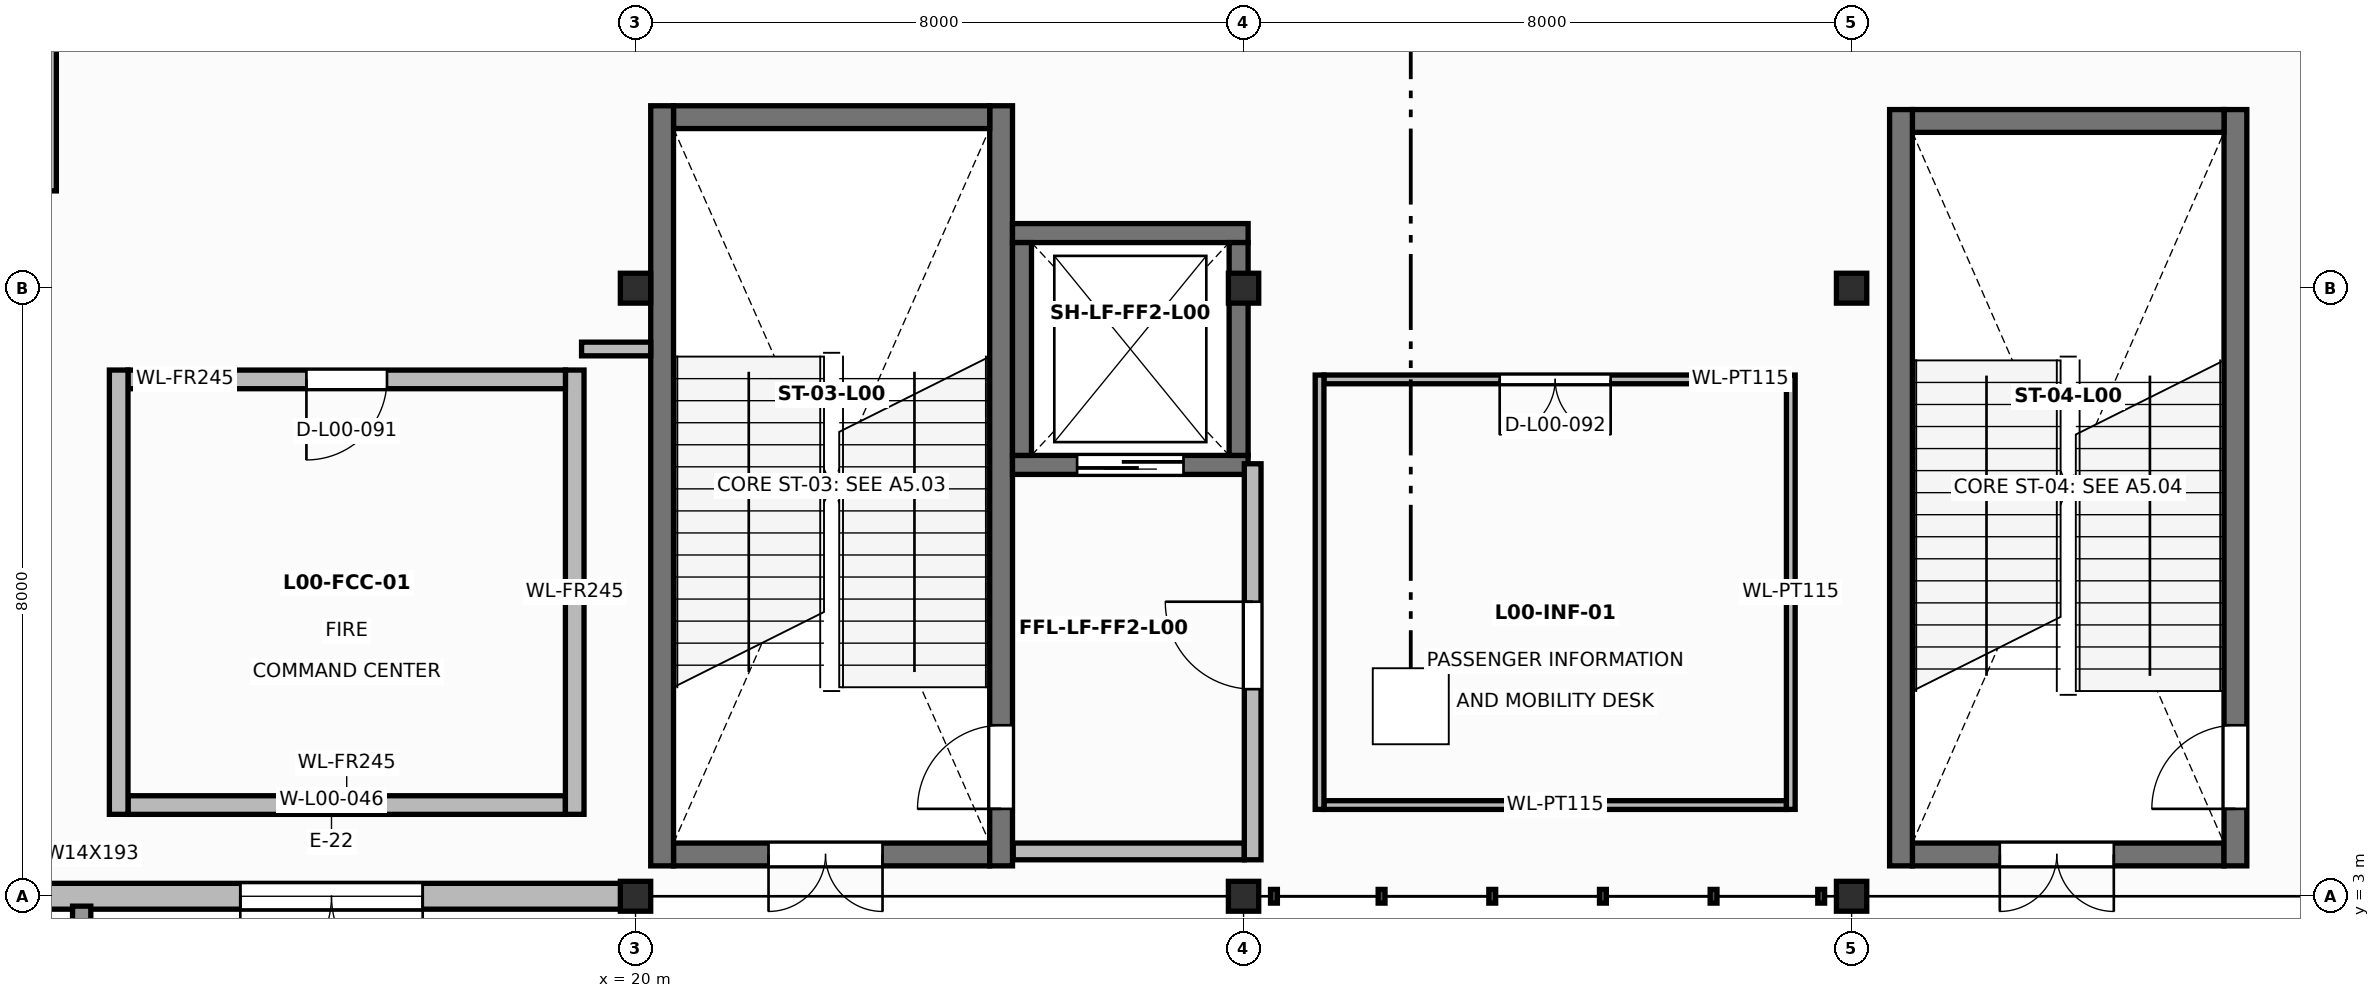
"""IFC4 building model, lengths in metres.
Left out: names, types, materials, properties, quantities, classifications, styles, units other than length and angle.
Written with IfcOpenShell. Run it as: python <this file> out.ifc"""

import sys

from ifc_helpers import new_model, si_unit, direction, frame, frame_2d, origin, origin_2d, place, context, subcontext, project, spatial, rectangle, i_section, extrude, element, fill, save


model = new_model("IFC4")
c1 = context("Model", 3, precision=1e-05, world=origin(), true_north=direction((0.0, 1.0)))
c2 = subcontext(c1, "Body", "Model", "MODEL_VIEW")
j1 = project(units=[si_unit("LENGTHUNIT", "METRE"), si_unit("PLANEANGLEUNIT", "RADIAN")], contexts=[c1])
p1 = place(None, origin())
s1 = spatial("IfcSite", under=j1, at=p1, CompositionType="ELEMENT")
p2 = place(p1, origin())
s2 = spatial("IfcBuilding", under=s1, at=p2, CompositionType="ELEMENT")
p3 = place(p2, origin())
s3 = spatial("IfcBuildingStorey", under=s2, at=p3, CompositionType="ELEMENT", Elevation=0.0)
for number, where, z_axis, x_axis in (
    (1, (20.0, 3.0, 0.0), (0.0, 0.0, 1.0), (1.0, 0.0, 0.0)),
    (2, (20.0, 11.0, 0.0), (0.0, 0.0, 1.0), (1.0, 0.0, 0.0)),
    (3, (28.0, 3.0, 0.0), (0.0, 0.0, 1.0), (1.0, 0.0, 0.0)),
    (4, (28.0, 11.0, 0.0), (0.0, 0.0, 1.0), (1.0, 0.0, 0.0)),
    (5, (36.0, 3.0, 0.0), (0.0, 0.0, 1.0), (1.0, 0.0, 0.0)),
    (6, (36.0, 11.0, 0.0), (0.0, 0.0, 1.0), (1.0, 0.0, 0.0)),
):
    element("IfcColumn", number, at=place(p3, frame(where, z_axis=z_axis, x_axis=x_axis)), inside=s3, PredefinedType="COLUMN", context=c2, shape_type="SweptSolid", body=[
        extrude(i_section(OverallWidth=0.399, OverallDepth=0.393, WebThickness=0.023, FlangeThickness=0.037, at=origin_2d()), origin(), (0.0, 0.0, 1.0), 6.0),
    ])
p4 = place(p3, frame((20.5, 3.55, 0.0), z_axis=(0.0, 0.0, 1.0), x_axis=(1.0, 0.0, 0.0)))
e7 = element("IfcWall", 7, at=p4, inside=s3, PredefinedType="SHEAR", context=c2, shape_type="SweptSolid", body=[
    extrude(rectangle(XDim=4.16, YDim=0.3, at=frame_2d((2.08, 0.0))), origin(), (0.0, 0.0, 1.0), 5.755),
])
p5 = place(p4, frame((1.25, 0.0, 0.0)))
e8 = element("IfcOpeningElement", 8, at=p5, cuts=e7, PredefinedType="OPENING", context=c2, shape_type="SweptSolid", body=[
    extrude(rectangle(XDim=1.5, YDim=2.2, at=frame_2d((0.75, 1.1))), frame((0.0, 0.16, 0.0), z_axis=(0.0, -1.0, 0.0), x_axis=(1.0, 0.0, 0.0)), (0.0, 0.0, 1.0), 0.32),
])
p6 = place(p3, frame((24.81, 3.4, 0.0), z_axis=(0.0, 0.0, 1.0), x_axis=(0.0, 1.0, 0.0)))
e9 = element("IfcWall", 9, at=p6, inside=s3, PredefinedType="SHEAR", context=c2, shape_type="SweptSolid", body=[
    extrude(rectangle(XDim=10.0, YDim=0.3, at=frame_2d((5.0, 0.0))), origin(), (0.0, 0.0, 1.0), 5.755),
])
p7 = place(p6, frame((0.75, 0.0, 0.0)))
e10 = element("IfcOpeningElement", 10, at=p7, cuts=e9, PredefinedType="OPENING", context=c2, shape_type="SweptSolid", body=[
    extrude(rectangle(XDim=1.1, YDim=2.15, at=frame_2d((0.55, 1.075))), frame((0.0, 0.16, 0.0), z_axis=(0.0, -1.0, 0.0), x_axis=(1.0, 0.0, 0.0)), (0.0, 0.0, 1.0), 0.32),
])
p8 = place(p3, frame((24.66, 13.25, 0.0), z_axis=(0.0, 0.0, 1.0), x_axis=(-1.0, 0.0, 0.0)))
e11 = element("IfcWall", 11, at=p8, inside=s3, PredefinedType="SHEAR", context=c2, shape_type="SweptSolid", body=[
    extrude(rectangle(XDim=4.16, YDim=0.3, at=frame_2d((2.08, 0.0))), origin(), (0.0, 0.0, 1.0), 5.755),
])
p9 = place(p3, frame((20.35, 13.4, 0.0), z_axis=(0.0, 0.0, 1.0), x_axis=(0.0, -1.0, 0.0)))
e12 = element("IfcWall", 12, at=p9, inside=s3, PredefinedType="SHEAR", context=c2, shape_type="SweptSolid", body=[
    extrude(rectangle(XDim=10.0, YDim=0.3, at=frame_2d((5.0, 0.0))), origin(), (0.0, 0.0, 1.0), 5.755),
])
p10 = place(p3, frame((36.8, 3.55, 0.0), z_axis=(0.0, 0.0, 1.0), x_axis=(1.0, 0.0, 0.0)))
e13 = element("IfcWall", 13, at=p10, inside=s3, PredefinedType="SHEAR", context=c2, shape_type="SweptSolid", body=[
    extrude(rectangle(XDim=4.1, YDim=0.3, at=frame_2d((2.05, 0.0))), origin(), (0.0, 0.0, 1.0), 5.755),
])
p11 = place(p10, frame((1.15, 0.0, 0.0)))
e14 = element("IfcOpeningElement", 14, at=p11, cuts=e13, PredefinedType="OPENING", context=c2, shape_type="SweptSolid", body=[
    extrude(rectangle(XDim=1.5, YDim=2.2, at=frame_2d((0.75, 1.1))), frame((0.0, 0.16, 0.0), z_axis=(0.0, -1.0, 0.0), x_axis=(1.0, 0.0, 0.0)), (0.0, 0.0, 1.0), 0.32),
])
p12 = place(p3, frame((41.05, 3.4, 0.0), z_axis=(0.0, 0.0, 1.0), x_axis=(0.0, 1.0, 0.0)))
e15 = element("IfcWall", 15, at=p12, inside=s3, PredefinedType="SHEAR", context=c2, shape_type="SweptSolid", body=[
    extrude(rectangle(XDim=9.95, YDim=0.3, at=frame_2d((4.975, 0.0))), origin(), (0.0, 0.0, 1.0), 5.755),
])
p13 = place(p12, frame((0.75, 0.0, 0.0)))
e16 = element("IfcOpeningElement", 16, at=p13, cuts=e15, PredefinedType="OPENING", context=c2, shape_type="SweptSolid", body=[
    extrude(rectangle(XDim=1.1, YDim=2.15, at=frame_2d((0.55, 1.075))), frame((0.0, 0.16, 0.0), z_axis=(0.0, -1.0, 0.0), x_axis=(1.0, 0.0, 0.0)), (0.0, 0.0, 1.0), 0.32),
])
p14 = place(p3, frame((40.9, 13.2, 0.0), z_axis=(0.0, 0.0, 1.0), x_axis=(-1.0, 0.0, 0.0)))
e17 = element("IfcWall", 17, at=p14, inside=s3, PredefinedType="SHEAR", context=c2, shape_type="SweptSolid", body=[
    extrude(rectangle(XDim=4.1, YDim=0.3, at=frame_2d((2.05, 0.0))), origin(), (0.0, 0.0, 1.0), 5.755),
])
p15 = place(p3, frame((36.65, 13.35, 0.0), z_axis=(0.0, 0.0, 1.0), x_axis=(0.0, -1.0, 0.0)))
e18 = element("IfcWall", 18, at=p15, inside=s3, PredefinedType="SHEAR", context=c2, shape_type="SweptSolid", body=[
    extrude(rectangle(XDim=9.95, YDim=0.3, at=frame_2d((4.975, 0.0))), origin(), (0.0, 0.0, 1.0), 5.755),
])
p16 = place(p3, frame((12.27, 12.28, 0.0), z_axis=(0.0, 0.0, 1.0), x_axis=(0.0, 1.0, 0.0)))
e19 = element("IfcWall", 19, at=p16, inside=s3, PredefinedType="SOLIDWALL", context=c2, shape_type="SweptSolid", body=[
    extrude(rectangle(XDim=5.21, YDim=0.22, at=frame_2d((2.605, 0.0))), origin(), (0.0, 0.0, 1.0), 5.755),
])
p17 = place(p3, frame((24.96, 8.675, 0.0), z_axis=(0.0, 0.0, 1.0), x_axis=(1.0, 0.0, 0.0)))
e20 = element("IfcWall", 20, at=p17, inside=s3, PredefinedType="SOLIDWALL", context=c2, shape_type="SweptSolid", body=[
    extrude(rectangle(XDim=3.1, YDim=0.25, at=frame_2d((1.55, 0.0))), origin(), (0.0, 0.0, 1.0), 5.755),
])
p18 = place(p17, frame((0.85, 0.0, 0.0)))
e21 = element("IfcOpeningElement", 21, at=p18, cuts=e20, PredefinedType="OPENING", context=c2, shape_type="SweptSolid", body=[
    extrude(rectangle(XDim=1.4, YDim=2.25, at=frame_2d((0.7, 1.125))), frame((0.0, 0.135, 0.0), z_axis=(0.0, -1.0, 0.0), x_axis=(1.0, 0.0, 0.0)), (0.0, 0.0, 1.0), 0.27),
])
p19 = place(p3, frame((28.06, 11.725, 0.0), z_axis=(0.0, 0.0, 1.0), x_axis=(-1.0, 0.0, 0.0)))
e22 = element("IfcWall", 22, at=p19, inside=s3, PredefinedType="SOLIDWALL", context=c2, shape_type="SweptSolid", body=[
    extrude(rectangle(XDim=3.1, YDim=0.25, at=frame_2d((1.55, 0.0))), origin(), (0.0, 0.0, 1.0), 5.755),
])
for number, where, z_axis, x_axis in (
    (23, (27.935, 8.8, 0.0), (0.0, 0.0, 1.0), (0.0, 1.0, 0.0)),
    (24, (25.085, 11.6, 0.0), (0.0, 0.0, 1.0), (0.0, -1.0, 0.0)),
):
    element("IfcWall", number, at=place(p3, frame(where, z_axis=z_axis, x_axis=x_axis)), inside=s3, PredefinedType="SOLIDWALL", context=c2, shape_type="SweptSolid", body=[
        extrude(rectangle(XDim=2.8, YDim=0.25, at=frame_2d((1.4, 0.0))), origin(), (0.0, 0.0, 1.0), 5.755),
    ])
p20 = place(p3, frame((24.97, 3.59, 0.0), z_axis=(0.0, 0.0, 1.0), x_axis=(1.0, 0.0, 0.0)))
e25 = element("IfcWall", 25, at=p20, inside=s3, PredefinedType="SOLIDWALL", context=c2, shape_type="SweptSolid", body=[
    extrude(rectangle(XDim=3.04, YDim=0.22, at=frame_2d((1.52, 0.0))), origin(), (0.0, 0.0, 1.0), 4.976),
])
p21 = place(p3, frame((28.12, 3.48, 0.0), z_axis=(0.0, 0.0, 1.0), x_axis=(0.0, 1.0, 0.0)))
e26 = element("IfcWall", 26, at=p21, inside=s3, PredefinedType="SOLIDWALL", context=c2, shape_type="SweptSolid", body=[
    extrude(rectangle(XDim=5.21, YDim=0.22, at=frame_2d((2.605, 0.0))), origin(), (0.0, 0.0, 1.0), 4.976),
])
p22 = place(p21, frame((2.245, 0.0, 0.0)))
e27 = element("IfcOpeningElement", 27, at=p22, cuts=e26, PredefinedType="OPENING", context=c2, shape_type="SweptSolid", body=[
    extrude(rectangle(XDim=1.15, YDim=2.15, at=frame_2d((0.575, 1.075))), frame((0.0, 0.12, 0.0), z_axis=(0.0, -1.0, 0.0), x_axis=(1.0, 0.0, 0.0)), (0.0, 0.0, 1.0), 0.24),
])
p23 = place(p3, frame((12.013, 3.0, 0.0), z_axis=(0.0, 0.0, 1.0), x_axis=(1.0, 0.0, 0.0)))
e28 = element("IfcWall", 28, at=p23, inside=s3, PredefinedType="SOLIDWALL", context=c2, shape_type="SweptSolid", body=[
    extrude(rectangle(XDim=7.974, YDim=0.34, at=frame_2d((3.987, 0.0))), origin(), (0.0, 0.0, 1.0), 4.976),
])
p24 = place(p23, frame((2.787, 0.0, 0.0)))
e29 = element("IfcOpeningElement", 29, at=p24, cuts=e28, PredefinedType="OPENING", context=c2, shape_type="SweptSolid", body=[
    extrude(rectangle(XDim=2.4, YDim=2.4, at=frame_2d((1.2, 1.2))), frame((0.0, 0.18, 0.0), z_axis=(0.0, -1.0, 0.0), x_axis=(1.0, 0.0, 0.0)), (0.0, 0.0, 1.0), 0.36),
])
p25 = place(p23, frame((2.787, 0.0, 2.6)))
e30 = element("IfcOpeningElement", 30, at=p25, cuts=e28, PredefinedType="OPENING", context=c2, shape_type="SweptSolid", body=[
    extrude(rectangle(XDim=2.4, YDim=0.8, at=frame_2d((1.2, 0.4))), frame((0.0, 0.18, 0.0), z_axis=(0.0, -1.0, 0.0), x_axis=(1.0, 0.0, 0.0)), (0.0, 0.0, 1.0), 0.36),
])
p26 = place(p3, frame((19.29, 10.2, 0.0), z_axis=(0.0, 0.0, 1.0), x_axis=(1.0, 0.0, 0.0)))
e31 = element("IfcWall", 31, at=p26, inside=s3, PredefinedType="PARTITIONING", context=c2, shape_type="SweptSolid", body=[
    extrude(rectangle(XDim=0.91, YDim=0.18, at=frame_2d((0.455, 0.0))), origin(), (0.0, 0.0, 1.0), 4.976),
])
p27 = place(p3, frame((13.322, 4.2, 0.0), z_axis=(0.0, 0.0, 1.0), x_axis=(1.0, 0.0, 0.0)))
e32 = element("IfcWall", 32, at=p27, inside=s3, PredefinedType="SOLIDWALL", context=c2, shape_type="SweptSolid", body=[
    extrude(rectangle(XDim=5.756, YDim=0.245, at=frame_2d((2.878, 0.0))), origin(), (0.0, 0.0, 1.0), 5.73),
])
p28 = place(p3, frame((19.2, 4.078, 0.0), z_axis=(0.0, 0.0, 1.0), x_axis=(0.0, 1.0, 0.0)))
e33 = element("IfcWall", 33, at=p28, inside=s3, PredefinedType="SOLIDWALL", context=c2, shape_type="SweptSolid", body=[
    extrude(rectangle(XDim=5.845, YDim=0.245, at=frame_2d((2.923, 0.0))), origin(), (0.0, 0.0, 1.0), 5.351),
])
p29 = place(p3, frame((19.078, 9.8, 0.0), z_axis=(0.0, 0.0, 1.0), x_axis=(-1.0, 0.0, 0.0)))
e34 = element("IfcWall", 34, at=p29, inside=s3, PredefinedType="SOLIDWALL", context=c2, shape_type="SweptSolid", body=[
    extrude(rectangle(XDim=5.756, YDim=0.245, at=frame_2d((2.878, 0.0))), origin(), (0.0, 0.0, 1.0), 5.73),
])
p30 = place(p29, frame((2.348, 0.0, 0.0)))
e35 = element("IfcOpeningElement", 35, at=p30, cuts=e34, PredefinedType="OPENING", context=c2, shape_type="SweptSolid", body=[
    extrude(rectangle(XDim=1.06, YDim=2.16, at=frame_2d((0.53, 1.08))), frame((0.0, 0.133, 0.0), z_axis=(0.0, -1.0, 0.0), x_axis=(1.0, 0.0, 0.0)), (0.0, 0.0, 1.0), 0.265),
])
p31 = place(p3, frame((13.2, 9.923, 0.0), z_axis=(0.0, 0.0, 1.0), x_axis=(0.0, -1.0, 0.0)))
e36 = element("IfcWall", 36, at=p31, inside=s3, PredefinedType="SOLIDWALL", context=c2, shape_type="SweptSolid", body=[
    extrude(rectangle(XDim=5.845, YDim=0.245, at=frame_2d((2.923, 0.0))), origin(), (0.0, 0.0, 1.0), 5.351),
])
p32 = place(p3, frame((29.058, 4.2, 0.0), z_axis=(0.0, 0.0, 1.0), x_axis=(1.0, 0.0, 0.0)))
e37 = element("IfcWall", 37, at=p32, inside=s3, PredefinedType="PARTITIONING", context=c2, shape_type="SweptSolid", body=[
    extrude(rectangle(XDim=6.085, YDim=0.115, at=frame_2d((3.042, 0.0))), origin(), (0.0, 0.0, 1.0), 5.73),
])
p33 = place(p3, frame((35.2, 4.143, 0.0), z_axis=(0.0, 0.0, 1.0), x_axis=(0.0, 1.0, 0.0)))
e38 = element("IfcWall", 38, at=p33, inside=s3, PredefinedType="PARTITIONING", context=c2, shape_type="SweptSolid", body=[
    extrude(rectangle(XDim=5.714, YDim=0.115, at=frame_2d((2.857, 0.0))), origin(), (0.0, 0.0, 1.0), 5.73),
])
p34 = place(p3, frame((35.143, 9.8, 0.0), z_axis=(0.0, 0.0, 1.0), x_axis=(-1.0, 0.0, 0.0)))
e39 = element("IfcWall", 39, at=p34, inside=s3, PredefinedType="PARTITIONING", context=c2, shape_type="SweptSolid", body=[
    extrude(rectangle(XDim=6.085, YDim=0.115, at=frame_2d((3.042, 0.0))), origin(), (0.0, 0.0, 1.0), 5.73),
])
p35 = place(p34, frame((2.313, 0.0, 0.0)))
e40 = element("IfcOpeningElement", 40, at=p35, cuts=e39, PredefinedType="OPENING", context=c2, shape_type="SweptSolid", body=[
    extrude(rectangle(XDim=1.46, YDim=2.2, at=frame_2d((0.73, 1.1))), frame((0.0, 0.067, 0.0), z_axis=(0.0, -1.0, 0.0), x_axis=(1.0, 0.0, 0.0)), (0.0, 0.0, 1.0), 0.135),
])
p36 = place(p3, frame((29.0, 9.857, 0.0), z_axis=(0.0, 0.0, 1.0), x_axis=(0.0, -1.0, 0.0)))
e41 = element("IfcWall", 41, at=p36, inside=s3, PredefinedType="PARTITIONING", context=c2, shape_type="SweptSolid", body=[
    extrude(rectangle(XDim=5.714, YDim=0.115, at=frame_2d((2.857, 0.0))), origin(), (0.0, 0.0, 1.0), 5.73),
])
p37 = place(p7, origin())
e42 = element("IfcDoor", 42, at=p37, inside=s3, OperationType="SINGLE_SWING_LEFT", PredefinedType="DOOR", context=c2, shape_type="SweptSolid", body=[
    extrude(rectangle(XDim=1.1, YDim=2.15, at=frame_2d((0.55, 1.075))), frame((0.0, 0.025, 0.0), z_axis=(0.0, -1.0, 0.0), x_axis=(1.0, 0.0, 0.0)), (0.0, 0.0, 1.0), 0.05),
])
fill(e10, e42)
p38 = place(p5, frame((1.5, 0.0, 0.0), z_axis=(0.0, 0.0, 1.0), x_axis=(-1.0, 0.0, 0.0)))
e43 = element("IfcDoor", 43, at=p38, inside=s3, OperationType="DOUBLE_DOOR_SINGLE_SWING", PredefinedType="DOOR", context=c2, shape_type="SweptSolid", body=[
    extrude(rectangle(XDim=1.5, YDim=2.2, at=frame_2d((0.75, 1.1))), frame((0.0, 0.025, 0.0), z_axis=(0.0, -1.0, 0.0), x_axis=(1.0, 0.0, 0.0)), (0.0, 0.0, 1.0), 0.05),
])
fill(e8, e43)
p39 = place(p13, origin())
e44 = element("IfcDoor", 44, at=p39, inside=s3, OperationType="SINGLE_SWING_LEFT", PredefinedType="DOOR", context=c2, shape_type="SweptSolid", body=[
    extrude(rectangle(XDim=1.1, YDim=2.15, at=frame_2d((0.55, 1.075))), frame((0.0, 0.025, 0.0), z_axis=(0.0, -1.0, 0.0), x_axis=(1.0, 0.0, 0.0)), (0.0, 0.0, 1.0), 0.05),
])
fill(e16, e44)
p40 = place(p11, frame((1.5, 0.0, 0.0), z_axis=(0.0, 0.0, 1.0), x_axis=(-1.0, 0.0, 0.0)))
e45 = element("IfcDoor", 45, at=p40, inside=s3, OperationType="DOUBLE_DOOR_SINGLE_SWING", PredefinedType="DOOR", context=c2, shape_type="SweptSolid", body=[
    extrude(rectangle(XDim=1.5, YDim=2.2, at=frame_2d((0.75, 1.1))), frame((0.0, 0.025, 0.0), z_axis=(0.0, -1.0, 0.0), x_axis=(1.0, 0.0, 0.0)), (0.0, 0.0, 1.0), 0.05),
])
fill(e14, e45)
p41 = place(p18, frame((1.4, 0.0, 0.0), z_axis=(0.0, 0.0, 1.0), x_axis=(-1.0, 0.0, 0.0)))
e46 = element("IfcDoor", 46, at=p41, inside=s3, OperationType="DOUBLE_DOOR_SLIDING", PredefinedType="DOOR", context=c2, shape_type="SweptSolid", body=[
    extrude(rectangle(XDim=1.4, YDim=2.25, at=frame_2d((0.7, 1.125))), frame((0.0, 0.025, 0.0), z_axis=(0.0, -1.0, 0.0), x_axis=(1.0, 0.0, 0.0)), (0.0, 0.0, 1.0), 0.05),
])
fill(e21, e46)
p42 = place(p22, origin())
e47 = element("IfcDoor", 47, at=p42, inside=s3, OperationType="SINGLE_SWING_RIGHT", PredefinedType="DOOR", context=c2, shape_type="SweptSolid", body=[
    extrude(rectangle(XDim=1.15, YDim=2.15, at=frame_2d((0.575, 1.075))), frame((0.0, 0.025, 0.0), z_axis=(0.0, -1.0, 0.0), x_axis=(1.0, 0.0, 0.0)), (0.0, 0.0, 1.0), 0.05),
])
fill(e27, e47)
p43 = place(p24, frame((2.4, 0.0, 0.0), z_axis=(0.0, 0.0, 1.0), x_axis=(-1.0, 0.0, 0.0)))
e48 = element("IfcDoor", 48, at=p43, inside=s3, OperationType="DOUBLE_DOOR_SINGLE_SWING", PredefinedType="DOOR", context=c2, shape_type="SweptSolid", body=[
    extrude(rectangle(XDim=2.4, YDim=2.4, at=frame_2d((1.2, 1.2))), frame((0.0, 0.025, 0.0), z_axis=(0.0, -1.0, 0.0), x_axis=(1.0, 0.0, 0.0)), (0.0, 0.0, 1.0), 0.05),
])
fill(e29, e48)
p44 = place(p25, origin())
e49 = element("IfcWindow", 49, at=p44, inside=s3, PartitioningType="SINGLE_PANEL", PredefinedType="LIGHTDOME", context=c2, shape_type="SweptSolid", body=[
    extrude(rectangle(XDim=2.4, YDim=0.8, at=frame_2d((1.2, 0.4))), frame((0.0, 0.03, 0.0), z_axis=(0.0, -1.0, 0.0), x_axis=(1.0, 0.0, 0.0)), (0.0, 0.0, 1.0), 0.06),
])
fill(e30, e49)
p45 = place(p30, origin())
e50 = element("IfcDoor", 50, at=p45, inside=s3, OperationType="SINGLE_SWING_RIGHT", PredefinedType="DOOR", context=c2, shape_type="SweptSolid", body=[
    extrude(rectangle(XDim=1.06, YDim=2.16, at=frame_2d((0.53, 1.08))), frame((0.0, 0.025, 0.0), z_axis=(0.0, -1.0, 0.0), x_axis=(1.0, 0.0, 0.0)), (0.0, 0.0, 1.0), 0.05),
])
fill(e35, e50)
p46 = place(p35, origin())
e51 = element("IfcDoor", 51, at=p46, inside=s3, OperationType="DOUBLE_DOOR_SINGLE_SWING", PredefinedType="DOOR", context=c2, shape_type="SweptSolid", body=[
    extrude(rectangle(XDim=1.46, YDim=2.2, at=frame_2d((0.73, 1.1))), frame((0.0, 0.025, 0.0), z_axis=(0.0, -1.0, 0.0), x_axis=(1.0, 0.0, 0.0)), (0.0, 0.0, 1.0), 0.05),
])
fill(e40, e51)
save(model, sys.argv[1])
